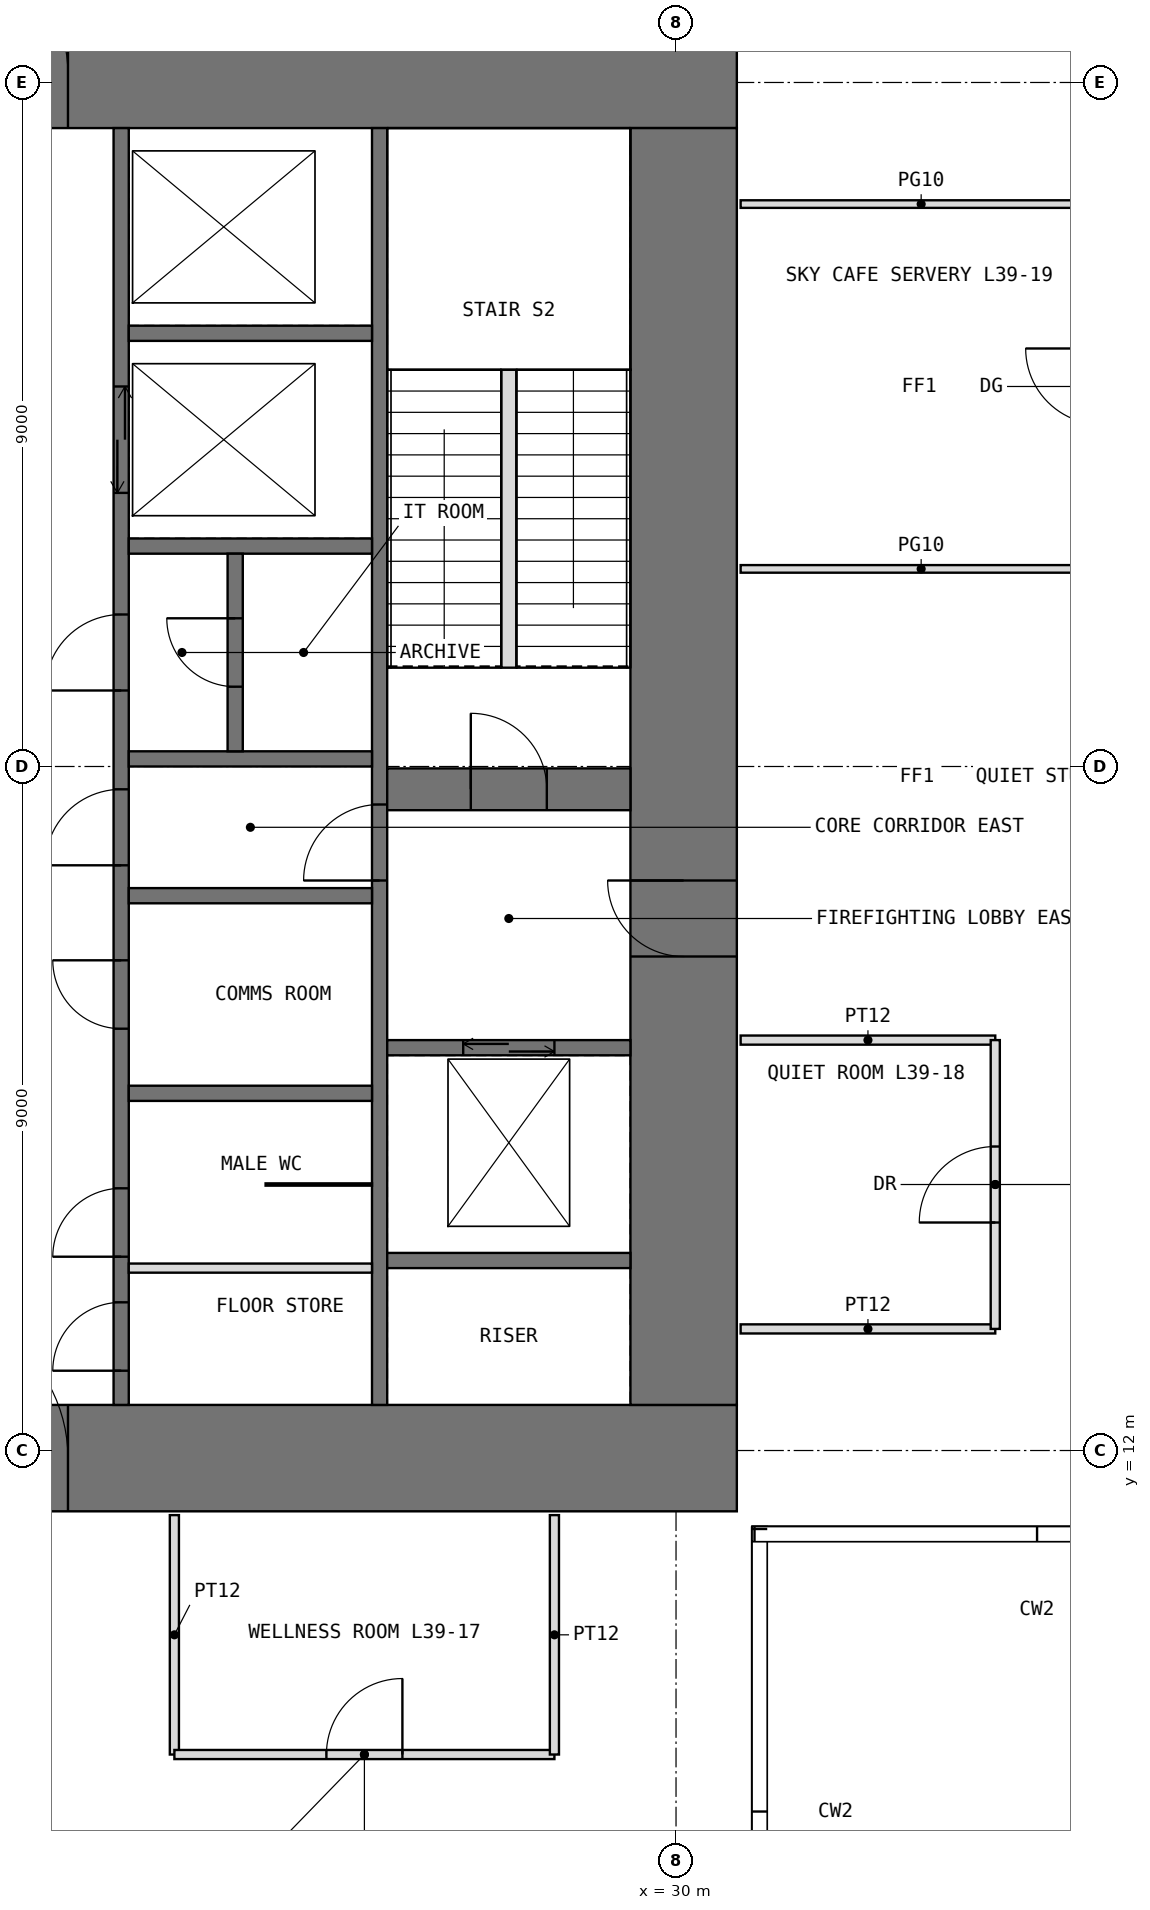
"""IFC4 building model, lengths in metres.
Left out: names, types, materials, properties, quantities, classifications, styles, units other than length and angle.
Written with IfcOpenShell. Run it as: python <this file> out.ifc"""

import sys

from ifc_helpers import new_model, si_unit, direction, frame, frame_2d, origin, place, context, subcontext, project, spatial, rectangle, extrude, element, fill, save


model = new_model("IFC4")
c1 = context("Model", 3, precision=1e-05, world=origin(), true_north=direction((0.0, 1.0)))
c2 = subcontext(c1, "Body", "Model", "MODEL_VIEW")
j1 = project(units=[si_unit("LENGTHUNIT", "METRE"), si_unit("PLANEANGLEUNIT", "RADIAN")], contexts=[c1])
p1 = place(None, origin())
s1 = spatial("IfcSite", under=j1, at=p1, CompositionType="ELEMENT")
p2 = place(p1, origin())
s2 = spatial("IfcBuilding", under=s1, at=p2, CompositionType="ELEMENT")
p3 = place(p2, frame((0.0, 0.0, 165.5)))
s3 = spatial("IfcBuildingStorey", under=s2, at=p3, CompositionType="ELEMENT", Elevation=165.5)
p4 = place(p3, frame((11.2, 11.9, -0.05), z_axis=(0.0, 0.0, 1.0), x_axis=(1.0, 0.0, 0.0)))
e1 = element("IfcWall", 1, at=p4, inside=s3, PredefinedType="SHEAR", context=c2, shape_type="SweptSolid", body=[
    extrude(rectangle(XDim=19.6, YDim=1.4, at=frame_2d((9.8, 0.0))), origin(), (0.0, 0.0, 1.0), 5.0),
])
p5 = place(p4, frame((8.8, 0.0, 0.05)))
e2 = element("IfcOpeningElement", 2, at=p5, cuts=e1, PredefinedType="OPENING", context=c2, shape_type="SweptSolid", body=[
    extrude(rectangle(XDim=2.0, YDim=2.2, at=frame_2d((1.0, 1.1))), frame((0.0, 0.71, 0.0), z_axis=(0.0, -1.0, 0.0), x_axis=(1.0, 0.0, 0.0)), (0.0, 0.0, 1.0), 1.42),
])
p6 = place(p3, frame((11.2, 30.1, -0.05), z_axis=(0.0, 0.0, 1.0), x_axis=(1.0, 0.0, 0.0)))
e3 = element("IfcWall", 3, at=p6, inside=s3, PredefinedType="SHEAR", context=c2, shape_type="SweptSolid", body=[
    extrude(rectangle(XDim=19.6, YDim=1.4, at=frame_2d((9.8, 0.0))), origin(), (0.0, 0.0, 1.0), 5.0),
])
p7 = place(p6, frame((8.8, 0.0, 0.05)))
e4 = element("IfcOpeningElement", 4, at=p7, cuts=e3, PredefinedType="OPENING", context=c2, shape_type="SweptSolid", body=[
    extrude(rectangle(XDim=2.0, YDim=2.2, at=frame_2d((1.0, 1.1))), frame((0.0, 0.71, 0.0), z_axis=(0.0, -1.0, 0.0), x_axis=(1.0, 0.0, 0.0)), (0.0, 0.0, 1.0), 1.42),
])
p8 = place(p3, frame((30.1, 12.6, -0.05), z_axis=(0.0, 0.0, 1.0), x_axis=(0.0, 1.0, 0.0)))
e5 = element("IfcWall", 5, at=p8, inside=s3, PredefinedType="SHEAR", context=c2, shape_type="SweptSolid", body=[
    extrude(rectangle(XDim=16.8, YDim=1.4, at=frame_2d((8.4, 0.0))), origin(), (0.0, 0.0, 1.0), 5.0),
])
p9 = place(p8, frame((5.9, 0.0, 0.05)))
e6 = element("IfcOpeningElement", 6, at=p9, cuts=e5, PredefinedType="OPENING", context=c2, shape_type="SweptSolid", body=[
    extrude(rectangle(XDim=1.0, YDim=2.2, at=frame_2d((0.5, 1.1))), frame((0.0, 0.71, 0.0), z_axis=(0.0, -1.0, 0.0), x_axis=(1.0, 0.0, 0.0)), (0.0, 0.0, 1.0), 1.42),
])
p10 = place(p3, frame((22.7, 12.6, -0.05), z_axis=(0.0, 0.0, 1.0), x_axis=(0.0, 1.0, 0.0)))
e7 = element("IfcWall", 7, at=p10, inside=s3, PredefinedType="SHEAR", context=c2, shape_type="SweptSolid", body=[
    extrude(rectangle(XDim=16.8, YDim=0.2, at=frame_2d((8.4, 0.0))), origin(), (0.0, 0.0, 1.0), 5.0),
])
p11 = place(p10, frame((0.45, 0.0, 0.05)))
e8 = element("IfcOpeningElement", 8, at=p11, cuts=e7, PredefinedType="OPENING", context=c2, shape_type="SweptSolid", body=[
    extrude(rectangle(XDim=0.9, YDim=2.2, at=frame_2d((0.45, 1.1))), frame((0.0, 0.11, 0.0), z_axis=(0.0, -1.0, 0.0), x_axis=(1.0, 0.0, 0.0)), (0.0, 0.0, 1.0), 0.22),
])
p12 = place(p10, frame((7.1, 0.0, 0.05)))
e9 = element("IfcOpeningElement", 9, at=p12, cuts=e7, PredefinedType="OPENING", context=c2, shape_type="SweptSolid", body=[
    extrude(rectangle(XDim=1.0, YDim=2.2, at=frame_2d((0.5, 1.1))), frame((0.0, 0.11, 0.0), z_axis=(0.0, -1.0, 0.0), x_axis=(1.0, 0.0, 0.0)), (0.0, 0.0, 1.0), 0.22),
])
p13 = place(p10, frame((1.95, 0.0, 0.05)))
e10 = element("IfcOpeningElement", 10, at=p13, cuts=e7, PredefinedType="OPENING", context=c2, shape_type="SweptSolid", body=[
    extrude(rectangle(XDim=0.9, YDim=2.2, at=frame_2d((0.45, 1.1))), frame((0.0, 0.11, 0.0), z_axis=(0.0, -1.0, 0.0), x_axis=(1.0, 0.0, 0.0)), (0.0, 0.0, 1.0), 0.22),
])
p14 = place(p10, frame((4.95, 0.0, 0.05)))
e11 = element("IfcOpeningElement", 11, at=p14, cuts=e7, PredefinedType="OPENING", context=c2, shape_type="SweptSolid", body=[
    extrude(rectangle(XDim=0.9, YDim=2.2, at=frame_2d((0.45, 1.1))), frame((0.0, 0.11, 0.0), z_axis=(0.0, -1.0, 0.0), x_axis=(1.0, 0.0, 0.0)), (0.0, 0.0, 1.0), 0.22),
])
p15 = place(p10, frame((9.4, 0.0, 0.05)))
e12 = element("IfcOpeningElement", 12, at=p15, cuts=e7, PredefinedType="OPENING", context=c2, shape_type="SweptSolid", body=[
    extrude(rectangle(XDim=1.0, YDim=2.2, at=frame_2d((0.5, 1.1))), frame((0.0, 0.11, 0.0), z_axis=(0.0, -1.0, 0.0), x_axis=(1.0, 0.0, 0.0)), (0.0, 0.0, 1.0), 0.22),
])
p16 = place(p10, frame((12.0, 0.0, 0.05)))
e13 = element("IfcOpeningElement", 13, at=p16, cuts=e7, PredefinedType="OPENING", context=c2, shape_type="SweptSolid", body=[
    extrude(rectangle(XDim=1.4, YDim=2.4, at=frame_2d((0.7, 1.2))), frame((0.0, 0.11, 0.0), z_axis=(0.0, -1.0, 0.0), x_axis=(1.0, 0.0, 0.0)), (0.0, 0.0, 1.0), 0.22),
])
p17 = place(p3, frame((26.1, 12.6, -0.05), z_axis=(0.0, 0.0, 1.0), x_axis=(0.0, 1.0, 0.0)))
e14 = element("IfcWall", 14, at=p17, inside=s3, PredefinedType="SHEAR", context=c2, shape_type="SweptSolid", body=[
    extrude(rectangle(XDim=16.8, YDim=0.2, at=frame_2d((8.4, 0.0))), origin(), (0.0, 0.0, 1.0), 5.0),
])
p18 = place(p17, frame((6.9, 0.0, 0.05)))
e15 = element("IfcOpeningElement", 15, at=p18, cuts=e14, PredefinedType="OPENING", context=c2, shape_type="SweptSolid", body=[
    extrude(rectangle(XDim=1.0, YDim=2.2, at=frame_2d((0.5, 1.1))), frame((0.0, 0.11, 0.0), z_axis=(0.0, -1.0, 0.0), x_axis=(1.0, 0.0, 0.0)), (0.0, 0.0, 1.0), 0.22),
])
for number, where, z_axis, x_axis in (
    (16, (22.8, 16.7, -0.05), (0.0, 0.0, 1.0), (1.0, 0.0, 0.0)),
    (17, (22.8, 19.3, -0.05), (0.0, 0.0, 1.0), (1.0, 0.0, 0.0)),
    (18, (22.8, 21.1, -0.05), (0.0, 0.0, 1.0), (1.0, 0.0, 0.0)),
    (19, (22.8, 23.9, -0.05), (0.0, 0.0, 1.0), (1.0, 0.0, 0.0)),
    (20, (22.8, 26.7, -0.05), (0.0, 0.0, 1.0), (1.0, 0.0, 0.0)),
    (21, (26.2, 14.5, -0.05), (0.0, 0.0, 1.0), (1.0, 0.0, 0.0)),
):
    element("IfcWall", number, at=place(p3, frame(where, z_axis=z_axis, x_axis=x_axis)), inside=s3, PredefinedType="SHEAR", context=c2, shape_type="SweptSolid", body=[
        extrude(rectangle(XDim=3.2, YDim=0.2, at=frame_2d((1.6, 0.0))), origin(), (0.0, 0.0, 1.0), 5.0),
    ])
p19 = place(p3, frame((26.2, 17.3, -0.05), z_axis=(0.0, 0.0, 1.0), x_axis=(1.0, 0.0, 0.0)))
e22 = element("IfcWall", 22, at=p19, inside=s3, PredefinedType="SHEAR", context=c2, shape_type="SweptSolid", body=[
    extrude(rectangle(XDim=3.2, YDim=0.2, at=frame_2d((1.6, 0.0))), origin(), (0.0, 0.0, 1.0), 5.0),
])
p20 = place(p19, frame((1.0, 0.0, 0.05)))
e23 = element("IfcOpeningElement", 23, at=p20, cuts=e22, PredefinedType="OPENING", context=c2, shape_type="SweptSolid", body=[
    extrude(rectangle(XDim=1.2, YDim=2.2, at=frame_2d((0.6, 1.1))), frame((0.0, 0.11, 0.0), z_axis=(0.0, -1.0, 0.0), x_axis=(1.0, 0.0, 0.0)), (0.0, 0.0, 1.0), 0.22),
])
p21 = place(p3, frame((26.2, 20.7, -0.05), z_axis=(0.0, 0.0, 1.0), x_axis=(1.0, 0.0, 0.0)))
e24 = element("IfcWall", 24, at=p21, inside=s3, PredefinedType="SHEAR", context=c2, shape_type="SweptSolid", body=[
    extrude(rectangle(XDim=3.2, YDim=0.55, at=frame_2d((1.6, 0.0))), origin(), (0.0, 0.0, 1.0), 5.0),
])
p22 = place(p21, frame((1.1, 0.0, 0.05)))
e25 = element("IfcOpeningElement", 25, at=p22, cuts=e24, PredefinedType="OPENING", context=c2, shape_type="SweptSolid", body=[
    extrude(rectangle(XDim=1.0, YDim=2.2, at=frame_2d((0.5, 1.1))), frame((0.0, 0.285, 0.0), z_axis=(0.0, -1.0, 0.0), x_axis=(1.0, 0.0, 0.0)), (0.0, 0.0, 1.0), 0.57),
])
p23 = place(p3, frame((22.8, 14.4, 0.0), z_axis=(0.0, 0.0, 1.0), x_axis=(1.0, 0.0, 0.0)))
e26 = element("IfcWall", 26, at=p23, inside=s3, PredefinedType="PARTITIONING", context=c2, shape_type="SweptSolid", body=[
    extrude(rectangle(XDim=3.2, YDim=0.12, at=frame_2d((1.6, 0.0))), origin(), (0.0, 0.0, 1.0), 4.75),
])
p24 = place(p3, frame((24.6, 15.5, 0.0), z_axis=(0.0, 0.0, 1.0), x_axis=(1.0, 0.0, 0.0)))
e27 = element("IfcWall", 27, at=p24, inside=s3, PredefinedType="PARTITIONING", context=c2, shape_type="SweptSolid", body=[
    extrude(rectangle(XDim=1.4, YDim=0.03, at=frame_2d((0.7, 0.0))), origin(), (0.0, 0.0, 1.0), 4.75),
])
p25 = place(p3, frame((24.2, 21.2, -0.05), z_axis=(0.0, 0.0, 1.0), x_axis=(0.0, 1.0, 0.0)))
e28 = element("IfcWall", 28, at=p25, inside=s3, PredefinedType="SHEAR", context=c2, shape_type="SweptSolid", body=[
    extrude(rectangle(XDim=2.6, YDim=0.2, at=frame_2d((1.3, 0.0))), origin(), (0.0, 0.0, 1.0), 5.0),
])
p26 = place(p25, frame((0.85, 0.0, 0.05)))
e29 = element("IfcOpeningElement", 29, at=p26, cuts=e28, PredefinedType="OPENING", context=c2, shape_type="SweptSolid", body=[
    extrude(rectangle(XDim=0.9, YDim=2.2, at=frame_2d((0.45, 1.1))), frame((0.0, 0.11, 0.0), z_axis=(0.0, -1.0, 0.0), x_axis=(1.0, 0.0, 0.0)), (0.0, 0.0, 1.0), 0.22),
])
p27 = place(p3, frame((23.4, 8.0, 0.0), z_axis=(0.0, 0.0, 1.0), x_axis=(0.0, 1.0, 0.0)))
e30 = element("IfcWall", 30, at=p27, inside=s3, PredefinedType="PARTITIONING", context=c2, shape_type="SweptSolid", body=[
    extrude(rectangle(XDim=3.15, YDim=0.12, at=frame_2d((1.575, 0.0))), origin(), (0.0, 0.0, 1.0), 4.75),
])
p28 = place(p3, frame((23.4, 8.0, 0.0), z_axis=(0.0, 0.0, 1.0), x_axis=(1.0, 0.0, 0.0)))
e31 = element("IfcWall", 31, at=p28, inside=s3, PredefinedType="PARTITIONING", context=c2, shape_type="SweptSolid", body=[
    extrude(rectangle(XDim=5.0, YDim=0.12, at=frame_2d((2.5, 0.0))), origin(), (0.0, 0.0, 1.0), 4.75),
])
p29 = place(p28, frame((2.0, 0.0, 0.0)))
e32 = element("IfcOpeningElement", 32, at=p29, cuts=e31, PredefinedType="OPENING", context=c2, shape_type="SweptSolid", body=[
    extrude(rectangle(XDim=1.0, YDim=2.2, at=frame_2d((0.5, 1.1))), frame((0.0, 0.07, 0.0), z_axis=(0.0, -1.0, 0.0), x_axis=(1.0, 0.0, 0.0)), (0.0, 0.0, 1.0), 0.14),
])
p30 = place(p3, frame((28.4, 8.0, 0.0), z_axis=(0.0, 0.0, 1.0), x_axis=(0.0, 1.0, 0.0)))
e33 = element("IfcWall", 33, at=p30, inside=s3, PredefinedType="PARTITIONING", context=c2, shape_type="SweptSolid", body=[
    extrude(rectangle(XDim=3.15, YDim=0.12, at=frame_2d((1.575, 0.0))), origin(), (0.0, 0.0, 1.0), 4.75),
])
for number, where, z_axis, x_axis in (
    (34, (30.85, 13.6, 0.0), (0.0, 0.0, 1.0), (1.0, 0.0, 0.0)),
    (35, (30.85, 17.4, 0.0), (0.0, 0.0, 1.0), (1.0, 0.0, 0.0)),
):
    element("IfcWall", number, at=place(p3, frame(where, z_axis=z_axis, x_axis=x_axis)), inside=s3, PredefinedType="PARTITIONING", context=c2, shape_type="SweptSolid", body=[
        extrude(rectangle(XDim=3.35, YDim=0.12, at=frame_2d((1.675, 0.0))), origin(), (0.0, 0.0, 1.0), 4.75),
    ])
for number, where, z_axis, x_axis in (
    (36, (30.85, 23.6, 0.0), (0.0, 0.0, 1.0), (1.0, 0.0, 0.0)),
    (37, (30.85, 28.4, 0.0), (0.0, 0.0, 1.0), (1.0, 0.0, 0.0)),
):
    element("IfcWall", number, at=place(p3, frame(where, z_axis=z_axis, x_axis=x_axis)), inside=s3, PredefinedType="PARTITIONING", context=c2, shape_type="SweptSolid", body=[
        extrude(rectangle(XDim=4.75, YDim=0.1, at=frame_2d((2.375, 0.0))), origin(), (0.0, 0.0, 1.0), 4.75),
    ])
p31 = place(p3, frame((34.2, 13.6, 0.0), z_axis=(0.0, 0.0, 1.0), x_axis=(0.0, 1.0, 0.0)))
e38 = element("IfcWall", 38, at=p31, inside=s3, PredefinedType="PARTITIONING", context=c2, shape_type="SweptSolid", body=[
    extrude(rectangle(XDim=3.8, YDim=0.12, at=frame_2d((1.9, 0.0))), origin(), (0.0, 0.0, 1.0), 4.75),
])
p32 = place(p31, frame((1.4, 0.0, 0.0)))
e39 = element("IfcOpeningElement", 39, at=p32, cuts=e38, PredefinedType="OPENING", context=c2, shape_type="SweptSolid", body=[
    extrude(rectangle(XDim=1.0, YDim=2.2, at=frame_2d((0.5, 1.1))), frame((0.0, 0.07, 0.0), z_axis=(0.0, -1.0, 0.0), x_axis=(1.0, 0.0, 0.0)), (0.0, 0.0, 1.0), 0.14),
])
p33 = place(p3, frame((27.8, 22.3, 0.0), z_axis=(0.0, 0.0, 1.0), x_axis=(0.0, 1.0, 0.0)))
e40 = element("IfcWall", 40, at=p33, inside=s3, PredefinedType="PARTITIONING", context=c2, shape_type="SweptSolid", body=[
    extrude(rectangle(XDim=3.92, YDim=0.2, at=frame_2d((1.96, 0.0))), origin(), (0.0, 0.0, 1.0), 5.0),
])
p34 = place(p5, origin())
e41 = element("IfcDoor", 41, at=p34, inside=s3, OperationType="DOUBLE_DOOR_SINGLE_SWING", PredefinedType="DOOR", context=c2, shape_type="SweptSolid", body=[
    extrude(rectangle(XDim=2.0, YDim=2.2, at=frame_2d((1.0, 1.1))), frame((0.0, 0.025, 0.0), z_axis=(0.0, -1.0, 0.0), x_axis=(1.0, 0.0, 0.0)), (0.0, 0.0, 1.0), 0.05),
])
fill(e2, e41)
p35 = place(p7, origin())
e42 = element("IfcDoor", 42, at=p35, inside=s3, OperationType="DOUBLE_DOOR_SINGLE_SWING", PredefinedType="DOOR", context=c2, shape_type="SweptSolid", body=[
    extrude(rectangle(XDim=2.0, YDim=2.2, at=frame_2d((1.0, 1.1))), frame((0.0, 0.025, 0.0), z_axis=(0.0, -1.0, 0.0), x_axis=(1.0, 0.0, 0.0)), (0.0, 0.0, 1.0), 0.05),
])
fill(e4, e42)
p36 = place(p11, origin())
e43 = element("IfcDoor", 43, at=p36, inside=s3, OperationType="SINGLE_SWING_LEFT", PredefinedType="DOOR", context=c2, shape_type="SweptSolid", body=[
    extrude(rectangle(XDim=0.9, YDim=2.2, at=frame_2d((0.45, 1.1))), frame((0.0, 0.025, 0.0), z_axis=(0.0, -1.0, 0.0), x_axis=(1.0, 0.0, 0.0)), (0.0, 0.0, 1.0), 0.05),
])
fill(e8, e43)
p37 = place(p9, origin())
e44 = element("IfcDoor", 44, at=p37, inside=s3, OperationType="SINGLE_SWING_RIGHT", PredefinedType="DOOR", context=c2, shape_type="SweptSolid", body=[
    extrude(rectangle(XDim=1.0, YDim=2.2, at=frame_2d((0.5, 1.1))), frame((0.0, 0.025, 0.0), z_axis=(0.0, -1.0, 0.0), x_axis=(1.0, 0.0, 0.0)), (0.0, 0.0, 1.0), 0.05),
])
fill(e6, e44)
p38 = place(p22, origin())
e45 = element("IfcDoor", 45, at=p38, inside=s3, OperationType="SINGLE_SWING_LEFT", PredefinedType="DOOR", context=c2, shape_type="SweptSolid", body=[
    extrude(rectangle(XDim=1.0, YDim=2.2, at=frame_2d((0.5, 1.1))), frame((0.0, 0.025, 0.0), z_axis=(0.0, -1.0, 0.0), x_axis=(1.0, 0.0, 0.0)), (0.0, 0.0, 1.0), 0.05),
])
fill(e25, e45)
p39 = place(p18, origin())
e46 = element("IfcDoor", 46, at=p39, inside=s3, OperationType="SINGLE_SWING_LEFT", PredefinedType="DOOR", context=c2, shape_type="SweptSolid", body=[
    extrude(rectangle(XDim=1.0, YDim=2.2, at=frame_2d((0.5, 1.1))), frame((0.0, 0.025, 0.0), z_axis=(0.0, -1.0, 0.0), x_axis=(1.0, 0.0, 0.0)), (0.0, 0.0, 1.0), 0.05),
])
fill(e15, e46)
p40 = place(p12, origin())
e47 = element("IfcDoor", 47, at=p40, inside=s3, OperationType="SINGLE_SWING_LEFT", PredefinedType="DOOR", context=c2, shape_type="SweptSolid", body=[
    extrude(rectangle(XDim=1.0, YDim=2.2, at=frame_2d((0.5, 1.1))), frame((0.0, 0.025, 0.0), z_axis=(0.0, -1.0, 0.0), x_axis=(1.0, 0.0, 0.0)), (0.0, 0.0, 1.0), 0.05),
])
fill(e9, e47)
p41 = place(p13, origin())
e48 = element("IfcDoor", 48, at=p41, inside=s3, OperationType="SINGLE_SWING_LEFT", PredefinedType="DOOR", context=c2, shape_type="SweptSolid", body=[
    extrude(rectangle(XDim=0.9, YDim=2.2, at=frame_2d((0.45, 1.1))), frame((0.0, 0.025, 0.0), z_axis=(0.0, -1.0, 0.0), x_axis=(1.0, 0.0, 0.0)), (0.0, 0.0, 1.0), 0.05),
])
fill(e10, e48)
p42 = place(p14, origin())
e49 = element("IfcDoor", 49, at=p42, inside=s3, OperationType="SINGLE_SWING_RIGHT", PredefinedType="DOOR", context=c2, shape_type="SweptSolid", body=[
    extrude(rectangle(XDim=0.9, YDim=2.2, at=frame_2d((0.45, 1.1))), frame((0.0, 0.025, 0.0), z_axis=(0.0, -1.0, 0.0), x_axis=(1.0, 0.0, 0.0)), (0.0, 0.0, 1.0), 0.05),
])
fill(e11, e49)
p43 = place(p15, origin())
e50 = element("IfcDoor", 50, at=p43, inside=s3, OperationType="SINGLE_SWING_LEFT", PredefinedType="DOOR", context=c2, shape_type="SweptSolid", body=[
    extrude(rectangle(XDim=1.0, YDim=2.2, at=frame_2d((0.5, 1.1))), frame((0.0, 0.025, 0.0), z_axis=(0.0, -1.0, 0.0), x_axis=(1.0, 0.0, 0.0)), (0.0, 0.0, 1.0), 0.05),
])
fill(e12, e50)
p44 = place(p26, origin())
e51 = element("IfcDoor", 51, at=p44, inside=s3, OperationType="SINGLE_SWING_RIGHT", PredefinedType="DOOR", context=c2, shape_type="SweptSolid", body=[
    extrude(rectangle(XDim=0.9, YDim=2.2, at=frame_2d((0.45, 1.1))), frame((0.0, 0.025, 0.0), z_axis=(0.0, -1.0, 0.0), x_axis=(1.0, 0.0, 0.0)), (0.0, 0.0, 1.0), 0.05),
])
fill(e29, e51)
p45 = place(p29, origin())
e52 = element("IfcDoor", 52, at=p45, inside=s3, OperationType="SINGLE_SWING_RIGHT", PredefinedType="DOOR", context=c2, shape_type="SweptSolid", body=[
    extrude(rectangle(XDim=1.0, YDim=2.2, at=frame_2d((0.5, 1.1))), frame((0.0, 0.025, 0.0), z_axis=(0.0, -1.0, 0.0), x_axis=(1.0, 0.0, 0.0)), (0.0, 0.0, 1.0), 0.05),
])
fill(e32, e52)
p46 = place(p32, origin())
e53 = element("IfcDoor", 53, at=p46, inside=s3, OperationType="SINGLE_SWING_LEFT", PredefinedType="DOOR", context=c2, shape_type="SweptSolid", body=[
    extrude(rectangle(XDim=1.0, YDim=2.2, at=frame_2d((0.5, 1.1))), frame((0.0, 0.025, 0.0), z_axis=(0.0, -1.0, 0.0), x_axis=(1.0, 0.0, 0.0)), (0.0, 0.0, 1.0), 0.05),
])
fill(e39, e53)
p47 = place(p16, origin())
e54 = element("IfcDoor", 54, at=p47, inside=s3, OperationType="DOUBLE_DOOR_SLIDING", PredefinedType="DOOR", context=c2, shape_type="SweptSolid", body=[
    extrude(rectangle(XDim=1.4, YDim=2.4, at=frame_2d((0.7, 1.2))), frame((0.0, 0.025, 0.0), z_axis=(0.0, -1.0, 0.0), x_axis=(1.0, 0.0, 0.0)), (0.0, 0.0, 1.0), 0.05),
])
fill(e13, e54)
p48 = place(p20, origin())
e55 = element("IfcDoor", 55, at=p48, inside=s3, OperationType="DOUBLE_DOOR_SLIDING", PredefinedType="DOOR", context=c2, shape_type="SweptSolid", body=[
    extrude(rectangle(XDim=1.2, YDim=2.2, at=frame_2d((0.6, 1.1))), frame((0.0, 0.025, 0.0), z_axis=(0.0, -1.0, 0.0), x_axis=(1.0, 0.0, 0.0)), (0.0, 0.0, 1.0), 0.05),
])
fill(e23, e55)
save(model, sys.argv[1])
